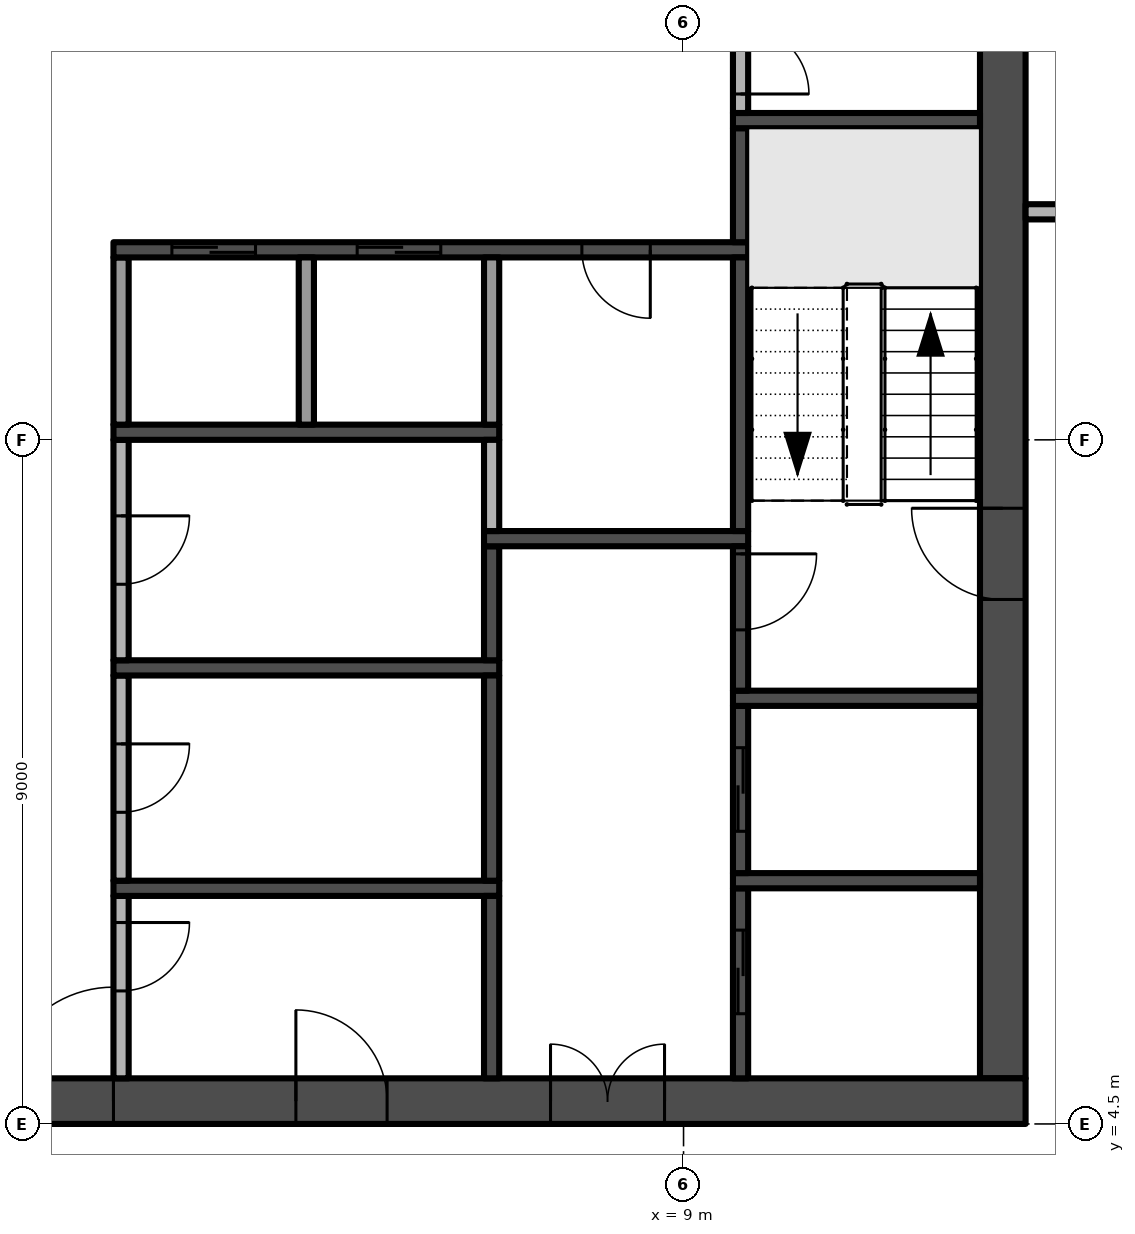
"""IFC4 building model, lengths in metres.
Left out: names, types, materials, properties, quantities, classifications, styles, units other than length and angle.
Written with IfcOpenShell. Run it as: python <this file> out.ifc"""

import sys

from ifc_helpers import new_model, si_unit, direction, frame, frame_2d, origin, place, context, subcontext, project, spatial, rectangle, extrude, element, fill, save


model = new_model("IFC4")
c1 = context("Model", 3, precision=1e-05, world=origin(), true_north=direction((0.0, 1.0)))
c2 = subcontext(c1, "Body", "Model", "MODEL_VIEW")
j1 = project(units=[si_unit("LENGTHUNIT", "METRE"), si_unit("PLANEANGLEUNIT", "RADIAN")], contexts=[c1])
p1 = place(None, origin())
s1 = spatial("IfcSite", under=j1, at=p1, CompositionType="ELEMENT")
p2 = place(p1, origin())
s2 = spatial("IfcBuilding", under=s1, at=p2, CompositionType="ELEMENT")
p3 = place(p2, frame((0.0, 0.0, 218.6)))
s3 = spatial("IfcBuildingStorey", under=s2, at=p3, CompositionType="ELEMENT", Elevation=218.6)
p4 = place(p3, frame((-13.5, 4.8, -0.3), z_axis=(0.0, 0.0, 1.0), x_axis=(1.0, 0.0, 0.0)))
e1 = element("IfcWall", 1, at=p4, inside=s3, PredefinedType="SHEAR", context=c2, shape_type="SweptSolid", body=[
    extrude(rectangle(XDim=27.0, YDim=0.6, at=frame_2d((13.5, 0.0))), origin(), (0.0, 0.0, 1.0), 3.8),
])
p5 = place(p4, frame((12.0, 0.0, 0.3)))
e2 = element("IfcOpeningElement", 2, at=p5, cuts=e1, PredefinedType="OPENING", context=c2, shape_type="SweptSolid", body=[
    extrude(rectangle(XDim=3.0, YDim=2.4, at=frame_2d((1.5, 1.2))), frame((0.0, 0.31, 0.0), z_axis=(0.0, -1.0, 0.0), x_axis=(1.0, 0.0, 0.0)), (0.0, 0.0, 1.0), 0.62),
])
p6 = place(p4, frame((4.9, 0.0, 0.3)))
e3 = element("IfcOpeningElement", 3, at=p6, cuts=e1, PredefinedType="OPENING", context=c2, shape_type="SweptSolid", body=[
    extrude(rectangle(XDim=1.2, YDim=2.2, at=frame_2d((0.6, 1.1))), frame((0.0, 0.31, 0.0), z_axis=(0.0, -1.0, 0.0), x_axis=(1.0, 0.0, 0.0)), (0.0, 0.0, 1.0), 0.62),
])
p7 = place(p4, frame((20.75, 0.0, 0.3)))
e4 = element("IfcOpeningElement", 4, at=p7, cuts=e1, PredefinedType="OPENING", context=c2, shape_type="SweptSolid", body=[
    extrude(rectangle(XDim=1.5, YDim=2.2, at=frame_2d((0.75, 1.1))), frame((0.0, 0.31, 0.0), z_axis=(0.0, -1.0, 0.0), x_axis=(1.0, 0.0, 0.0)), (0.0, 0.0, 1.0), 0.62),
])
p8 = place(p4, frame((17.4, 0.0, 0.3)))
e5 = element("IfcOpeningElement", 5, at=p8, cuts=e1, PredefinedType="OPENING", context=c2, shape_type="SweptSolid", body=[
    extrude(rectangle(XDim=1.2, YDim=2.2, at=frame_2d((0.6, 1.1))), frame((0.0, 0.31, 0.0), z_axis=(0.0, -1.0, 0.0), x_axis=(1.0, 0.0, 0.0)), (0.0, 0.0, 1.0), 0.62),
])
p9 = place(p3, frame((13.2, 5.1, -0.3), z_axis=(0.0, 0.0, 1.0), x_axis=(0.0, 1.0, 0.0)))
e6 = element("IfcWall", 6, at=p9, inside=s3, PredefinedType="SHEAR", context=c2, shape_type="SweptSolid", body=[
    extrude(rectangle(XDim=16.8, YDim=0.6, at=frame_2d((8.4, 0.0))), origin(), (0.0, 0.0, 1.0), 3.8),
])
p10 = place(p9, frame((6.3, 0.0, 0.3)))
e7 = element("IfcOpeningElement", 7, at=p10, cuts=e6, PredefinedType="OPENING", context=c2, shape_type="SweptSolid", body=[
    extrude(rectangle(XDim=1.2, YDim=2.2, at=frame_2d((0.6, 1.1))), frame((0.0, 0.31, 0.0), z_axis=(0.0, -1.0, 0.0), x_axis=(1.0, 0.0, 0.0)), (0.0, 0.0, 1.0), 0.62),
])
p11 = place(p3, frame((1.6, 7.5, 0.0), z_axis=(0.0, 0.0, 1.0), x_axis=(0.0, -1.0, 0.0)))
e8 = element("IfcWall", 8, at=p11, inside=s3, PredefinedType="PARTITIONING", context=c2, shape_type="SweptSolid", body=[
    extrude(rectangle(XDim=2.4, YDim=0.2, at=frame_2d((1.2, 0.0))), origin(), (0.0, 0.0, 1.0), 3.5),
])
p12 = place(p11, frame((0.35, 0.0, 0.0)))
e9 = element("IfcOpeningElement", 9, at=p12, cuts=e8, PredefinedType="OPENING", context=c2, shape_type="SweptSolid", body=[
    extrude(rectangle(XDim=0.9, YDim=2.1, at=frame_2d((0.45, 1.05))), frame((0.0, 0.11, 0.0), z_axis=(0.0, -1.0, 0.0), x_axis=(1.0, 0.0, 0.0)), (0.0, 0.0, 1.0), 0.22),
])
p13 = place(p3, frame((1.5, 7.6, 0.0), z_axis=(0.0, 0.0, 1.0), x_axis=(1.0, 0.0, 0.0)))
e10 = element("IfcWall", 10, at=p13, inside=s3, PredefinedType="SHEAR", context=c2, shape_type="SweptSolid", body=[
    extrude(rectangle(XDim=5.075, YDim=0.2, at=frame_2d((2.538, 0.0))), origin(), (0.0, 0.0, 1.0), 3.5),
])
p14 = place(p3, frame((1.6, 10.4, 0.0), z_axis=(0.0, 0.0, 1.0), x_axis=(0.0, -1.0, 0.0)))
e11 = element("IfcWall", 11, at=p14, inside=s3, PredefinedType="PARTITIONING", context=c2, shape_type="SweptSolid", body=[
    extrude(rectangle(XDim=2.7, YDim=0.2, at=frame_2d((1.35, 0.0))), origin(), (0.0, 0.0, 1.0), 3.5),
])
p15 = place(p14, frame((0.9, 0.0, 0.0)))
e12 = element("IfcOpeningElement", 12, at=p15, cuts=e11, PredefinedType="OPENING", context=c2, shape_type="SweptSolid", body=[
    extrude(rectangle(XDim=0.9, YDim=2.1, at=frame_2d((0.45, 1.05))), frame((0.0, 0.11, 0.0), z_axis=(0.0, -1.0, 0.0), x_axis=(1.0, 0.0, 0.0)), (0.0, 0.0, 1.0), 0.22),
])
p16 = place(p3, frame((1.5, 10.5, 0.0), z_axis=(0.0, 0.0, 1.0), x_axis=(1.0, 0.0, 0.0)))
e13 = element("IfcWall", 13, at=p16, inside=s3, PredefinedType="SHEAR", context=c2, shape_type="SweptSolid", body=[
    extrude(rectangle(XDim=5.075, YDim=0.2, at=frame_2d((2.538, 0.0))), origin(), (0.0, 0.0, 1.0), 3.5),
])
p17 = place(p3, frame((1.6, 13.5, 0.0), z_axis=(0.0, 0.0, 1.0), x_axis=(0.0, -1.0, 0.0)))
e14 = element("IfcWall", 14, at=p17, inside=s3, PredefinedType="PARTITIONING", context=c2, shape_type="SweptSolid", body=[
    extrude(rectangle(XDim=2.9, YDim=0.2, at=frame_2d((1.45, 0.0))), origin(), (0.0, 0.0, 1.0), 3.5),
])
p18 = place(p17, frame((1.0, 0.0, 0.0)))
e15 = element("IfcOpeningElement", 15, at=p18, cuts=e14, PredefinedType="OPENING", context=c2, shape_type="SweptSolid", body=[
    extrude(rectangle(XDim=0.9, YDim=2.1, at=frame_2d((0.45, 1.05))), frame((0.0, 0.11, 0.0), z_axis=(0.0, -1.0, 0.0), x_axis=(1.0, 0.0, 0.0)), (0.0, 0.0, 1.0), 0.22),
])
p19 = place(p3, frame((1.5, 13.6, 0.0), z_axis=(0.0, 0.0, 1.0), x_axis=(1.0, 0.0, 0.0)))
e16 = element("IfcWall", 16, at=p19, inside=s3, PredefinedType="SHEAR", context=c2, shape_type="SweptSolid", body=[
    extrude(rectangle(XDim=5.075, YDim=0.2, at=frame_2d((2.538, 0.0))), origin(), (0.0, 0.0, 1.0), 3.5),
])
p20 = place(p3, frame((1.6, 13.7, 0.0), z_axis=(0.0, 0.0, 1.0), x_axis=(0.0, 1.0, 0.0)))
e17 = element("IfcWall", 17, at=p20, inside=s3, PredefinedType="PARTITIONING", context=c2, shape_type="SweptSolid", body=[
    extrude(rectangle(XDim=2.2, YDim=0.2, at=frame_2d((1.1, 0.0))), origin(), (0.0, 0.0, 1.0), 3.5),
])
p21 = place(p3, frame((9.85, 16.0, 0.0), z_axis=(0.0, 0.0, 1.0), x_axis=(-1.0, 0.0, 0.0)))
e18 = element("IfcWall", 18, at=p21, inside=s3, PredefinedType="SHEAR", context=c2, shape_type="SweptSolid", body=[
    extrude(rectangle(XDim=8.35, YDim=0.2, at=frame_2d((4.175, 0.0))), origin(), (0.0, 0.0, 1.0), 3.5),
])
p22 = place(p21, frame((6.481, 0.0, 0.0)))
e19 = element("IfcOpeningElement", 19, at=p22, cuts=e18, PredefinedType="OPENING", context=c2, shape_type="SweptSolid", body=[
    extrude(rectangle(XDim=1.1, YDim=2.1, at=frame_2d((0.55, 1.05))), frame((0.0, 0.11, 0.0), z_axis=(0.0, -1.0, 0.0), x_axis=(1.0, 0.0, 0.0)), (0.0, 0.0, 1.0), 0.22),
])
p23 = place(p21, frame((4.044, 0.0, 0.0)))
e20 = element("IfcOpeningElement", 20, at=p23, cuts=e18, PredefinedType="OPENING", context=c2, shape_type="SweptSolid", body=[
    extrude(rectangle(XDim=1.1, YDim=2.1, at=frame_2d((0.55, 1.05))), frame((0.0, 0.11, 0.0), z_axis=(0.0, -1.0, 0.0), x_axis=(1.0, 0.0, 0.0)), (0.0, 0.0, 1.0), 0.22),
])
p24 = place(p21, frame((1.288, 0.0, 0.0)))
e21 = element("IfcOpeningElement", 21, at=p24, cuts=e18, PredefinedType="OPENING", context=c2, shape_type="SweptSolid", body=[
    extrude(rectangle(XDim=0.9, YDim=2.1, at=frame_2d((0.45, 1.05))), frame((0.0, 0.11, 0.0), z_axis=(0.0, -1.0, 0.0), x_axis=(1.0, 0.0, 0.0)), (0.0, 0.0, 1.0), 0.22),
])
p25 = place(p3, frame((4.037, 13.7, 0.0), z_axis=(0.0, 0.0, 1.0), x_axis=(0.0, 1.0, 0.0)))
e22 = element("IfcWall", 22, at=p25, inside=s3, PredefinedType="PARTITIONING", context=c2, shape_type="SweptSolid", body=[
    extrude(rectangle(XDim=2.2, YDim=0.2, at=frame_2d((1.1, 0.0))), origin(), (0.0, 0.0, 1.0), 3.5),
])
p26 = place(p3, frame((6.475, 5.1, 0.0), z_axis=(0.0, 0.0, 1.0), x_axis=(0.0, 1.0, 0.0)))
e23 = element("IfcWall", 23, at=p26, inside=s3, PredefinedType="SHEAR", context=c2, shape_type="SweptSolid", body=[
    extrude(rectangle(XDim=2.4, YDim=0.2, at=frame_2d((1.2, 0.0))), origin(), (0.0, 0.0, 1.0), 3.5),
])
p27 = place(p3, frame((6.475, 7.7, 0.0), z_axis=(0.0, 0.0, 1.0), x_axis=(0.0, 1.0, 0.0)))
e24 = element("IfcWall", 24, at=p27, inside=s3, PredefinedType="SHEAR", context=c2, shape_type="SweptSolid", body=[
    extrude(rectangle(XDim=2.7, YDim=0.2, at=frame_2d((1.35, 0.0))), origin(), (0.0, 0.0, 1.0), 3.5),
])
p28 = place(p3, frame((6.475, 10.6, 0.0), z_axis=(0.0, 0.0, 1.0), x_axis=(0.0, 1.0, 0.0)))
e25 = element("IfcWall", 25, at=p28, inside=s3, PredefinedType="SHEAR", context=c2, shape_type="SweptSolid", body=[
    extrude(rectangle(XDim=1.5, YDim=0.2, at=frame_2d((0.75, 0.0))), origin(), (0.0, 0.0, 1.0), 3.5),
])
p29 = place(p3, frame((6.375, 12.2, 0.0), z_axis=(0.0, 0.0, 1.0), x_axis=(1.0, 0.0, 0.0)))
e26 = element("IfcWall", 26, at=p29, inside=s3, PredefinedType="SHEAR", context=c2, shape_type="SweptSolid", body=[
    extrude(rectangle(XDim=3.475, YDim=0.2, at=frame_2d((1.738, 0.0))), origin(), (0.0, 0.0, 1.0), 3.5),
])
p30 = place(p3, frame((6.475, 12.3, 0.0), z_axis=(0.0, 0.0, 1.0), x_axis=(0.0, 1.0, 0.0)))
e27 = element("IfcWall", 27, at=p30, inside=s3, PredefinedType="PARTITIONING", context=c2, shape_type="SweptSolid", body=[
    extrude(rectangle(XDim=1.2, YDim=0.2, at=frame_2d((0.6, 0.0))), origin(), (0.0, 0.0, 1.0), 3.5),
])
p31 = place(p3, frame((6.475, 13.7, 0.0), z_axis=(0.0, 0.0, 1.0), x_axis=(0.0, 1.0, 0.0)))
e28 = element("IfcWall", 28, at=p31, inside=s3, PredefinedType="PARTITIONING", context=c2, shape_type="SweptSolid", body=[
    extrude(rectangle(XDim=2.2, YDim=0.2, at=frame_2d((1.1, 0.0))), origin(), (0.0, 0.0, 1.0), 3.5),
])
p32 = place(p3, frame((9.75, 5.1, 0.0), z_axis=(0.0, 0.0, 1.0), x_axis=(0.0, 1.0, 0.0)))
e29 = element("IfcWall", 29, at=p32, inside=s3, PredefinedType="SHEAR", context=c2, shape_type="SweptSolid", body=[
    extrude(rectangle(XDim=2.5, YDim=0.2, at=frame_2d((1.25, 0.0))), origin(), (0.0, 0.0, 1.0), 3.5),
])
p33 = place(p32, frame((0.85, 0.0, 0.0)))
e30 = element("IfcOpeningElement", 30, at=p33, cuts=e29, PredefinedType="OPENING", context=c2, shape_type="SweptSolid", body=[
    extrude(rectangle(XDim=1.1, YDim=2.1, at=frame_2d((0.55, 1.05))), frame((0.0, 0.11, 0.0), z_axis=(0.0, -1.0, 0.0), x_axis=(1.0, 0.0, 0.0)), (0.0, 0.0, 1.0), 0.22),
])
p34 = place(p3, frame((9.65, 7.7, 0.0), z_axis=(0.0, 0.0, 1.0), x_axis=(1.0, 0.0, 0.0)))
e31 = element("IfcWall", 31, at=p34, inside=s3, PredefinedType="SHEAR", context=c2, shape_type="SweptSolid", body=[
    extrude(rectangle(XDim=3.25, YDim=0.2, at=frame_2d((1.625, 0.0))), origin(), (0.0, 0.0, 1.0), 3.5),
])
p35 = place(p3, frame((9.75, 7.8, 0.0), z_axis=(0.0, 0.0, 1.0), x_axis=(0.0, 1.0, 0.0)))
e32 = element("IfcWall", 32, at=p35, inside=s3, PredefinedType="SHEAR", context=c2, shape_type="SweptSolid", body=[
    extrude(rectangle(XDim=2.2, YDim=0.2, at=frame_2d((1.1, 0.0))), origin(), (0.0, 0.0, 1.0), 3.5),
])
p36 = place(p35, frame((0.55, 0.0, 0.0)))
e33 = element("IfcOpeningElement", 33, at=p36, cuts=e32, PredefinedType="OPENING", context=c2, shape_type="SweptSolid", body=[
    extrude(rectangle(XDim=1.1, YDim=2.1, at=frame_2d((0.55, 1.05))), frame((0.0, 0.11, 0.0), z_axis=(0.0, -1.0, 0.0), x_axis=(1.0, 0.0, 0.0)), (0.0, 0.0, 1.0), 0.22),
])
p37 = place(p3, frame((9.65, 10.1, 0.0), z_axis=(0.0, 0.0, 1.0), x_axis=(1.0, 0.0, 0.0)))
e34 = element("IfcWall", 34, at=p37, inside=s3, PredefinedType="SHEAR", context=c2, shape_type="SweptSolid", body=[
    extrude(rectangle(XDim=3.25, YDim=0.2, at=frame_2d((1.625, 0.0))), origin(), (0.0, 0.0, 1.0), 3.5),
])
p38 = place(p3, frame((9.75, 12.1, 0.0), z_axis=(0.0, 0.0, 1.0), x_axis=(0.0, -1.0, 0.0)))
e35 = element("IfcWall", 35, at=p38, inside=s3, PredefinedType="SHEAR", context=c2, shape_type="SweptSolid", body=[
    extrude(rectangle(XDim=1.9, YDim=0.2, at=frame_2d((0.95, 0.0))), origin(), (0.0, 0.0, 1.0), 3.5),
])
p39 = place(p38, frame((0.1, 0.0, 0.0)))
e36 = element("IfcOpeningElement", 36, at=p39, cuts=e35, PredefinedType="OPENING", context=c2, shape_type="SweptSolid", body=[
    extrude(rectangle(XDim=1.0, YDim=2.2, at=frame_2d((0.5, 1.1))), frame((0.0, 0.11, 0.0), z_axis=(0.0, -1.0, 0.0), x_axis=(1.0, 0.0, 0.0)), (0.0, 0.0, 1.0), 0.22),
])
p40 = place(p3, frame((9.75, 12.3, 0.0), z_axis=(0.0, 0.0, 1.0), x_axis=(0.0, 1.0, 0.0)))
e37 = element("IfcWall", 37, at=p40, inside=s3, PredefinedType="SHEAR", context=c2, shape_type="SweptSolid", body=[
    extrude(rectangle(XDim=3.6, YDim=0.2, at=frame_2d((1.8, 0.0))), origin(), (0.0, 0.0, 1.0), 3.5),
])
p41 = place(p3, frame((9.75, 16.1, 0.0), z_axis=(0.0, 0.0, 1.0), x_axis=(0.0, 1.0, 0.0)))
e38 = element("IfcWall", 38, at=p41, inside=s3, PredefinedType="SHEAR", context=c2, shape_type="SweptSolid", body=[
    extrude(rectangle(XDim=1.5, YDim=0.2, at=frame_2d((0.75, 0.0))), origin(), (0.0, 0.0, 1.0), 3.5),
])
p42 = place(p3, frame((9.65, 17.7, 0.0), z_axis=(0.0, 0.0, 1.0), x_axis=(1.0, 0.0, 0.0)))
e39 = element("IfcWall", 39, at=p42, inside=s3, PredefinedType="SHEAR", context=c2, shape_type="SweptSolid", body=[
    extrude(rectangle(XDim=3.25, YDim=0.2, at=frame_2d((1.625, 0.0))), origin(), (0.0, 0.0, 1.0), 3.5),
])
p43 = place(p3, frame((9.75, 19.2, 0.0), z_axis=(0.0, 0.0, 1.0), x_axis=(0.0, -1.0, 0.0)))
e40 = element("IfcWall", 40, at=p43, inside=s3, PredefinedType="PARTITIONING", context=c2, shape_type="SweptSolid", body=[
    extrude(rectangle(XDim=1.4, YDim=0.2, at=frame_2d((0.7, 0.0))), origin(), (0.0, 0.0, 1.0), 3.5),
])
p44 = place(p43, frame((0.25, 0.0, 0.0)))
e41 = element("IfcOpeningElement", 41, at=p44, cuts=e40, PredefinedType="OPENING", context=c2, shape_type="SweptSolid", body=[
    extrude(rectangle(XDim=0.9, YDim=2.1, at=frame_2d((0.45, 1.05))), frame((0.0, 0.11, 0.0), z_axis=(0.0, -1.0, 0.0), x_axis=(1.0, 0.0, 0.0)), (0.0, 0.0, 1.0), 0.22),
])
p45 = place(p3, frame((13.5, 16.5, 0.0), z_axis=(0.0, 0.0, 1.0), x_axis=(1.0, 0.0, 0.0)))
e42 = element("IfcWall", 42, at=p45, inside=s3, PredefinedType="PARTITIONING", context=c2, shape_type="SweptSolid", body=[
    extrude(rectangle(XDim=3.825, YDim=0.2, at=frame_2d((1.913, 0.0))), origin(), (0.0, 0.0, 1.0), 3.5),
])
p46 = place(p45, frame((1.55, 0.0, 0.0)))
e43 = element("IfcOpeningElement", 43, at=p46, cuts=e42, PredefinedType="OPENING", context=c2, shape_type="SweptSolid", body=[
    extrude(rectangle(XDim=0.9, YDim=2.1, at=frame_2d((0.45, 1.05))), frame((0.0, 0.11, 0.0), z_axis=(0.0, -1.0, 0.0), x_axis=(1.0, 0.0, 0.0)), (0.0, 0.0, 1.0), 0.22),
])
p47 = place(p5, frame((3.0, 0.0, 0.0), z_axis=(0.0, 0.0, 1.0), x_axis=(-1.0, 0.0, 0.0)))
e44 = element("IfcDoor", 44, at=p47, inside=s3, OperationType="DOUBLE_DOOR_SINGLE_SWING", PredefinedType="DOOR", context=c2, shape_type="SweptSolid", body=[
    extrude(rectangle(XDim=3.0, YDim=2.4, at=frame_2d((1.5, 1.2))), frame((0.0, 0.025, 0.0), z_axis=(0.0, -1.0, 0.0), x_axis=(1.0, 0.0, 0.0)), (0.0, 0.0, 1.0), 0.05),
])
fill(e2, e44)
p48 = place(p10, frame((1.2, 0.0, 0.0), z_axis=(0.0, 0.0, 1.0), x_axis=(-1.0, 0.0, 0.0)))
e45 = element("IfcDoor", 45, at=p48, inside=s3, OperationType="SINGLE_SWING_LEFT", PredefinedType="DOOR", context=c2, shape_type="SweptSolid", body=[
    extrude(rectangle(XDim=1.2, YDim=2.2, at=frame_2d((0.6, 1.1))), frame((0.0, 0.025, 0.0), z_axis=(0.0, -1.0, 0.0), x_axis=(1.0, 0.0, 0.0)), (0.0, 0.0, 1.0), 0.05),
])
fill(e7, e45)
p49 = place(p7, frame((1.5, 0.0, 0.0), z_axis=(0.0, 0.0, 1.0), x_axis=(-1.0, 0.0, 0.0)))
e46 = element("IfcDoor", 46, at=p49, inside=s3, OperationType="DOUBLE_DOOR_SINGLE_SWING", PredefinedType="DOOR", context=c2, shape_type="SweptSolid", body=[
    extrude(rectangle(XDim=1.5, YDim=2.2, at=frame_2d((0.75, 1.1))), frame((0.0, 0.025, 0.0), z_axis=(0.0, -1.0, 0.0), x_axis=(1.0, 0.0, 0.0)), (0.0, 0.0, 1.0), 0.05),
])
fill(e4, e46)
p50 = place(p8, frame((1.2, 0.0, 0.0), z_axis=(0.0, 0.0, 1.0), x_axis=(-1.0, 0.0, 0.0)))
e47 = element("IfcDoor", 47, at=p50, inside=s3, OperationType="SINGLE_SWING_RIGHT", PredefinedType="DOOR", context=c2, shape_type="SweptSolid", body=[
    extrude(rectangle(XDim=1.2, YDim=2.2, at=frame_2d((0.6, 1.1))), frame((0.0, 0.025, 0.0), z_axis=(0.0, -1.0, 0.0), x_axis=(1.0, 0.0, 0.0)), (0.0, 0.0, 1.0), 0.05),
])
fill(e5, e47)
p51 = place(p39, origin())
e48 = element("IfcDoor", 48, at=p51, inside=s3, OperationType="SINGLE_SWING_LEFT", PredefinedType="DOOR", context=c2, shape_type="SweptSolid", body=[
    extrude(rectangle(XDim=1.0, YDim=2.2, at=frame_2d((0.5, 1.1))), frame((0.0, 0.025, 0.0), z_axis=(0.0, -1.0, 0.0), x_axis=(1.0, 0.0, 0.0)), (0.0, 0.0, 1.0), 0.05),
])
fill(e36, e48)
p52 = place(p22, origin())
e49 = element("IfcDoor", 49, at=p52, inside=s3, OperationType="SLIDING_TO_RIGHT", PredefinedType="DOOR", context=c2, shape_type="SweptSolid", body=[
    extrude(rectangle(XDim=1.1, YDim=2.1, at=frame_2d((0.55, 1.05))), frame((0.0, 0.025, 0.0), z_axis=(0.0, -1.0, 0.0), x_axis=(1.0, 0.0, 0.0)), (0.0, 0.0, 1.0), 0.05),
])
fill(e19, e49)
p53 = place(p23, origin())
e50 = element("IfcDoor", 50, at=p53, inside=s3, OperationType="SLIDING_TO_RIGHT", PredefinedType="DOOR", context=c2, shape_type="SweptSolid", body=[
    extrude(rectangle(XDim=1.1, YDim=2.1, at=frame_2d((0.55, 1.05))), frame((0.0, 0.025, 0.0), z_axis=(0.0, -1.0, 0.0), x_axis=(1.0, 0.0, 0.0)), (0.0, 0.0, 1.0), 0.05),
])
fill(e20, e50)
p54 = place(p33, origin())
e51 = element("IfcDoor", 51, at=p54, inside=s3, OperationType="SLIDING_TO_RIGHT", PredefinedType="DOOR", context=c2, shape_type="SweptSolid", body=[
    extrude(rectangle(XDim=1.1, YDim=2.1, at=frame_2d((0.55, 1.05))), frame((0.0, 0.025, 0.0), z_axis=(0.0, -1.0, 0.0), x_axis=(1.0, 0.0, 0.0)), (0.0, 0.0, 1.0), 0.05),
])
fill(e30, e51)
p55 = place(p36, origin())
e52 = element("IfcDoor", 52, at=p55, inside=s3, OperationType="SLIDING_TO_RIGHT", PredefinedType="DOOR", context=c2, shape_type="SweptSolid", body=[
    extrude(rectangle(XDim=1.1, YDim=2.1, at=frame_2d((0.55, 1.05))), frame((0.0, 0.025, 0.0), z_axis=(0.0, -1.0, 0.0), x_axis=(1.0, 0.0, 0.0)), (0.0, 0.0, 1.0), 0.05),
])
fill(e33, e52)
p56 = place(p12, origin())
e53 = element("IfcDoor", 53, at=p56, inside=s3, OperationType="SINGLE_SWING_LEFT", PredefinedType="DOOR", context=c2, shape_type="SweptSolid", body=[
    extrude(rectangle(XDim=0.9, YDim=2.1, at=frame_2d((0.45, 1.05))), frame((0.0, 0.025, 0.0), z_axis=(0.0, -1.0, 0.0), x_axis=(1.0, 0.0, 0.0)), (0.0, 0.0, 1.0), 0.05),
])
fill(e9, e53)
p57 = place(p15, origin())
e54 = element("IfcDoor", 54, at=p57, inside=s3, OperationType="SINGLE_SWING_LEFT", PredefinedType="DOOR", context=c2, shape_type="SweptSolid", body=[
    extrude(rectangle(XDim=0.9, YDim=2.1, at=frame_2d((0.45, 1.05))), frame((0.0, 0.025, 0.0), z_axis=(0.0, -1.0, 0.0), x_axis=(1.0, 0.0, 0.0)), (0.0, 0.0, 1.0), 0.05),
])
fill(e12, e54)
p58 = place(p18, origin())
e55 = element("IfcDoor", 55, at=p58, inside=s3, OperationType="SINGLE_SWING_LEFT", PredefinedType="DOOR", context=c2, shape_type="SweptSolid", body=[
    extrude(rectangle(XDim=0.9, YDim=2.1, at=frame_2d((0.45, 1.05))), frame((0.0, 0.025, 0.0), z_axis=(0.0, -1.0, 0.0), x_axis=(1.0, 0.0, 0.0)), (0.0, 0.0, 1.0), 0.05),
])
fill(e15, e55)
p59 = place(p24, origin())
e56 = element("IfcDoor", 56, at=p59, inside=s3, OperationType="SINGLE_SWING_LEFT", PredefinedType="DOOR", context=c2, shape_type="SweptSolid", body=[
    extrude(rectangle(XDim=0.9, YDim=2.1, at=frame_2d((0.45, 1.05))), frame((0.0, 0.025, 0.0), z_axis=(0.0, -1.0, 0.0), x_axis=(1.0, 0.0, 0.0)), (0.0, 0.0, 1.0), 0.05),
])
fill(e21, e56)
p60 = place(p44, origin())
e57 = element("IfcDoor", 57, at=p60, inside=s3, OperationType="SINGLE_SWING_RIGHT", PredefinedType="DOOR", context=c2, shape_type="SweptSolid", body=[
    extrude(rectangle(XDim=0.9, YDim=2.1, at=frame_2d((0.45, 1.05))), frame((0.0, 0.025, 0.0), z_axis=(0.0, -1.0, 0.0), x_axis=(1.0, 0.0, 0.0)), (0.0, 0.0, 1.0), 0.05),
])
fill(e41, e57)
save(model, sys.argv[1])
